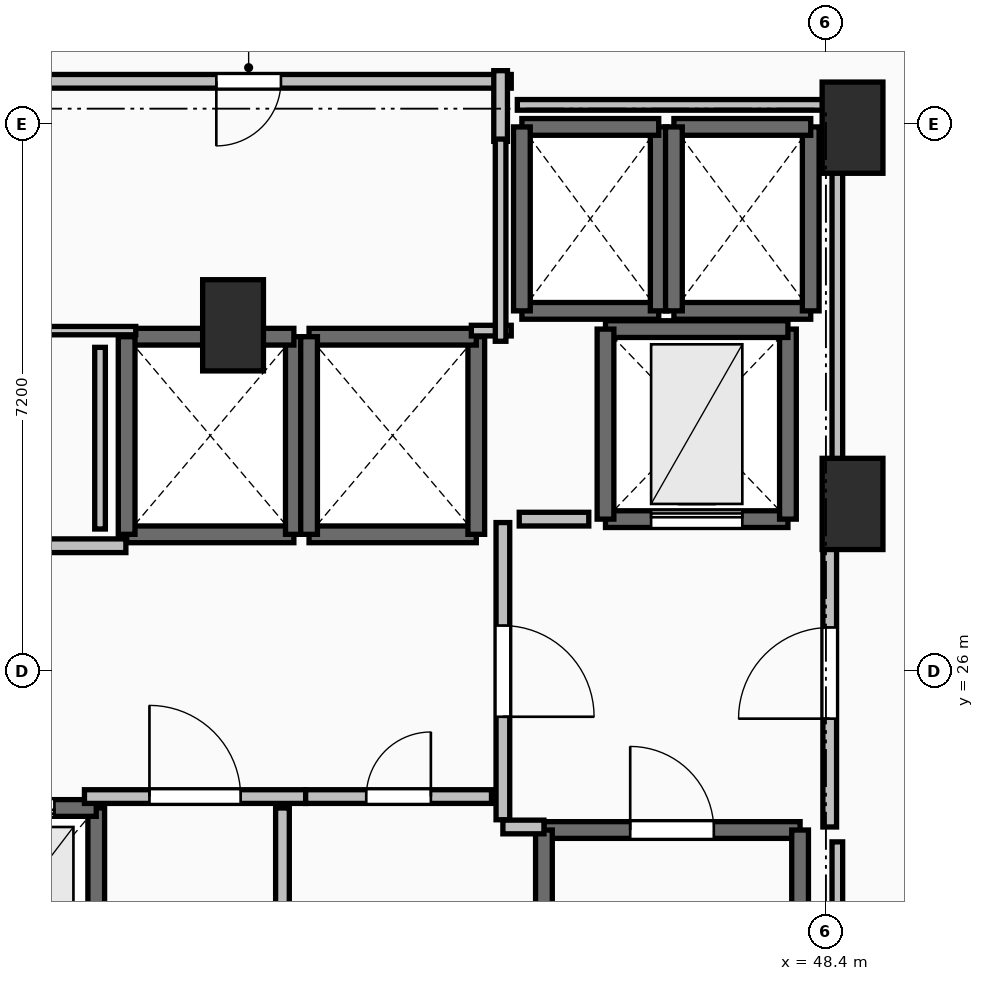
"""IFC4 building model, lengths in metres.
Left out: names, types, materials, properties, quantities, classifications, styles, units other than length and angle.
Written with IfcOpenShell. Run it as: python <this file> out.ifc"""

import sys

from ifc_helpers import new_model, si_unit, direction, frame, frame_2d, origin, origin_2d, place, context, subcontext, project, spatial, rectangle, extrude, element, fill, save


model = new_model("IFC4")
c1 = context("Model", 3, precision=1e-05, world=origin(), true_north=direction((0.0, 1.0)))
c2 = subcontext(c1, "Body", "Model", "MODEL_VIEW")
j1 = project(units=[si_unit("LENGTHUNIT", "METRE"), si_unit("PLANEANGLEUNIT", "RADIAN")], contexts=[c1])
p1 = place(None, origin())
s1 = spatial("IfcSite", under=j1, at=p1, CompositionType="ELEMENT")
p2 = place(p1, origin())
s2 = spatial("IfcBuilding", under=s1, at=p2, CompositionType="ELEMENT")
p3 = place(p2, frame((0.0, 0.0, 150.1)))
s3 = spatial("IfcBuildingStorey", under=s2, at=p3, CompositionType="ELEMENT", Elevation=150.1)
for number, where, z_axis, x_axis in (
    (1, (48.75, 33.15, 0.0), (0.0, 0.0, 1.0), (1.0, 0.0, 0.0)),
    (2, (48.75, 28.2, 0.0), (0.0, 0.0, 1.0), (1.0, 0.0, 0.0)),
    (3, (40.6, 30.55, 0.0), (0.0, 0.0, 1.0), (1.0, 0.0, 0.0)),
):
    element("IfcColumn", number, at=place(p3, frame(where, z_axis=z_axis, x_axis=x_axis)), inside=s3, PredefinedType="PILASTER", context=c2, shape_type="SweptSolid", body=[
        extrude(rectangle(XDim=0.8, YDim=1.2, at=origin_2d()), origin(), (0.0, 0.0, 1.0), 3.5),
    ])
p4 = place(p3, frame((44.69, 23.91, 0.0), z_axis=(0.0, 0.0, 1.0), x_axis=(1.0, 0.0, 0.0)))
e4 = element("IfcWall", 4, at=p4, inside=s3, PredefinedType="SOLIDWALL", context=c2, shape_type="SweptSolid", body=[
    extrude(rectangle(XDim=3.37, YDim=0.22, at=frame_2d((1.685, 0.0))), origin(), (0.0, 0.0, 1.0), 3.24),
])
p5 = place(p4, frame((1.135, 0.0, 0.0)))
e5 = element("IfcOpeningElement", 5, at=p5, cuts=e4, PredefinedType="OPENING", context=c2, shape_type="SweptSolid", body=[
    extrude(rectangle(XDim=1.1, YDim=2.15, at=frame_2d((0.55, 1.075))), frame((0.0, 0.125, 0.0), z_axis=(0.0, -1.0, 0.0), x_axis=(1.0, 0.0, 0.0)), (0.0, 0.0, 1.0), 0.25),
])
for number, where, z_axis, x_axis in (
    (6, (48.06, 23.91, 0.0), (0.0, 0.0, 1.0), (0.0, -1.0, 0.0)),
    (7, (44.69, 16.49, 0.0), (0.0, 0.0, 1.0), (0.0, 1.0, 0.0)),
):
    element("IfcWall", number, at=place(p3, frame(where, z_axis=z_axis, x_axis=x_axis)), inside=s3, PredefinedType="SOLIDWALL", context=c2, shape_type="SweptSolid", body=[
        extrude(rectangle(XDim=7.42, YDim=0.22, at=frame_2d((3.71, 0.0))), origin(), (0.0, 0.0, 1.0), 3.24),
    ])
p6 = place(p3, frame((38.8, 21.6, 0.0), z_axis=(0.0, 0.0, 1.0), x_axis=(0.0, 1.0, 0.0)))
e8 = element("IfcWall", 8, at=p6, inside=s3, PredefinedType="SOLIDWALL", context=c2, shape_type="SweptSolid", body=[
    extrude(rectangle(XDim=2.6, YDim=0.22, at=frame_2d((1.3, 0.0))), origin(), (0.0, 0.0, 1.0), 3.24),
])
p7 = place(p3, frame((38.8, 24.2, 0.0), z_axis=(0.0, 0.0, 1.0), x_axis=(-1.0, 0.0, 0.0)))
e9 = element("IfcWall", 9, at=p7, inside=s3, PredefinedType="SOLIDWALL", context=c2, shape_type="SweptSolid", body=[
    extrude(rectangle(XDim=2.2, YDim=0.22, at=frame_2d((1.1, 0.0))), origin(), (0.0, 0.0, 1.0), 3.24),
])
p8 = place(p7, frame((0.55, 0.0, 0.0)))
e10 = element("IfcOpeningElement", 10, at=p8, cuts=e9, PredefinedType="OPENING", context=c2, shape_type="SweptSolid", body=[
    extrude(rectangle(XDim=1.1, YDim=2.2, at=frame_2d((0.55, 1.1))), frame((0.0, 0.125, 0.0), z_axis=(0.0, -1.0, 0.0), x_axis=(1.0, 0.0, 0.0)), (0.0, 0.0, 1.0), 0.25),
])
p9 = place(p3, frame((39.2, 27.8, 0.0), z_axis=(0.0, 0.0, 1.0), x_axis=(1.0, 0.0, 0.0)))
e11 = element("IfcWall", 11, at=p9, inside=s3, PredefinedType="SOLIDWALL", context=c2, shape_type="SweptSolid", body=[
    extrude(rectangle(XDim=2.2, YDim=0.22, at=frame_2d((1.1, 0.0))), origin(), (0.0, 0.0, 1.0), 3.24),
])
p10 = place(p3, frame((41.4, 27.8, 0.0), z_axis=(0.0, 0.0, 1.0), x_axis=(0.0, 1.0, 0.0)))
e12 = element("IfcWall", 12, at=p10, inside=s3, PredefinedType="SOLIDWALL", context=c2, shape_type="SweptSolid", body=[
    extrude(rectangle(XDim=2.6, YDim=0.22, at=frame_2d((1.3, 0.0))), origin(), (0.0, 0.0, 1.0), 3.24),
])
p11 = place(p3, frame((41.4, 30.4, 0.0), z_axis=(0.0, 0.0, 1.0), x_axis=(-1.0, 0.0, 0.0)))
e13 = element("IfcWall", 13, at=p11, inside=s3, PredefinedType="SOLIDWALL", context=c2, shape_type="SweptSolid", body=[
    extrude(rectangle(XDim=2.2, YDim=0.22, at=frame_2d((1.1, 0.0))), origin(), (0.0, 0.0, 1.0), 3.24),
])
p12 = place(p3, frame((39.2, 30.4, 0.0), z_axis=(0.0, 0.0, 1.0), x_axis=(0.0, -1.0, 0.0)))
e14 = element("IfcWall", 14, at=p12, inside=s3, PredefinedType="SOLIDWALL", context=c2, shape_type="SweptSolid", body=[
    extrude(rectangle(XDim=2.6, YDim=0.22, at=frame_2d((1.3, 0.0))), origin(), (0.0, 0.0, 1.0), 3.24),
])
p13 = place(p3, frame((41.6, 27.8, 0.0), z_axis=(0.0, 0.0, 1.0), x_axis=(1.0, 0.0, 0.0)))
e15 = element("IfcWall", 15, at=p13, inside=s3, PredefinedType="SOLIDWALL", context=c2, shape_type="SweptSolid", body=[
    extrude(rectangle(XDim=2.2, YDim=0.22, at=frame_2d((1.1, 0.0))), origin(), (0.0, 0.0, 1.0), 3.24),
])
p14 = place(p3, frame((43.8, 27.8, 0.0), z_axis=(0.0, 0.0, 1.0), x_axis=(0.0, 1.0, 0.0)))
e16 = element("IfcWall", 16, at=p14, inside=s3, PredefinedType="SOLIDWALL", context=c2, shape_type="SweptSolid", body=[
    extrude(rectangle(XDim=2.6, YDim=0.22, at=frame_2d((1.3, 0.0))), origin(), (0.0, 0.0, 1.0), 3.24),
])
p15 = place(p3, frame((43.8, 30.4, 0.0), z_axis=(0.0, 0.0, 1.0), x_axis=(-1.0, 0.0, 0.0)))
e17 = element("IfcWall", 17, at=p15, inside=s3, PredefinedType="SOLIDWALL", context=c2, shape_type="SweptSolid", body=[
    extrude(rectangle(XDim=2.2, YDim=0.22, at=frame_2d((1.1, 0.0))), origin(), (0.0, 0.0, 1.0), 3.24),
])
p16 = place(p3, frame((41.6, 30.4, 0.0), z_axis=(0.0, 0.0, 1.0), x_axis=(0.0, -1.0, 0.0)))
e18 = element("IfcWall", 18, at=p16, inside=s3, PredefinedType="SOLIDWALL", context=c2, shape_type="SweptSolid", body=[
    extrude(rectangle(XDim=2.6, YDim=0.22, at=frame_2d((1.3, 0.0))), origin(), (0.0, 0.0, 1.0), 3.24),
])
p17 = place(p3, frame((44.4, 30.74, 0.0), z_axis=(0.0, 0.0, 1.0), x_axis=(1.0, 0.0, 0.0)))
e19 = element("IfcWall", 19, at=p17, inside=s3, PredefinedType="SOLIDWALL", context=c2, shape_type="SweptSolid", body=[
    extrude(rectangle(XDim=1.8, YDim=0.22, at=frame_2d((0.9, 0.0))), origin(), (0.0, 0.0, 1.0), 3.24),
])
p18 = place(p3, frame((46.2, 30.74, 0.0), z_axis=(0.0, 0.0, 1.0), x_axis=(0.0, 1.0, 0.0)))
e20 = element("IfcWall", 20, at=p18, inside=s3, PredefinedType="SOLIDWALL", context=c2, shape_type="SweptSolid", body=[
    extrude(rectangle(XDim=2.42, YDim=0.22, at=frame_2d((1.21, 0.0))), origin(), (0.0, 0.0, 1.0), 3.24),
])
p19 = place(p3, frame((46.2, 33.16, 0.0), z_axis=(0.0, 0.0, 1.0), x_axis=(-1.0, 0.0, 0.0)))
e21 = element("IfcWall", 21, at=p19, inside=s3, PredefinedType="SOLIDWALL", context=c2, shape_type="SweptSolid", body=[
    extrude(rectangle(XDim=1.8, YDim=0.22, at=frame_2d((0.9, 0.0))), origin(), (0.0, 0.0, 1.0), 3.24),
])
p20 = place(p3, frame((44.4, 33.16, 0.0), z_axis=(0.0, 0.0, 1.0), x_axis=(0.0, -1.0, 0.0)))
e22 = element("IfcWall", 22, at=p20, inside=s3, PredefinedType="SOLIDWALL", context=c2, shape_type="SweptSolid", body=[
    extrude(rectangle(XDim=2.42, YDim=0.22, at=frame_2d((1.21, 0.0))), origin(), (0.0, 0.0, 1.0), 3.24),
])
p21 = place(p3, frame((46.4, 30.74, 0.0), z_axis=(0.0, 0.0, 1.0), x_axis=(1.0, 0.0, 0.0)))
e23 = element("IfcWall", 23, at=p21, inside=s3, PredefinedType="SOLIDWALL", context=c2, shape_type="SweptSolid", body=[
    extrude(rectangle(XDim=1.8, YDim=0.22, at=frame_2d((0.9, 0.0))), origin(), (0.0, 0.0, 1.0), 3.24),
])
p22 = place(p3, frame((48.2, 30.74, 0.0), z_axis=(0.0, 0.0, 1.0), x_axis=(0.0, 1.0, 0.0)))
e24 = element("IfcWall", 24, at=p22, inside=s3, PredefinedType="SOLIDWALL", context=c2, shape_type="SweptSolid", body=[
    extrude(rectangle(XDim=2.42, YDim=0.22, at=frame_2d((1.21, 0.0))), origin(), (0.0, 0.0, 1.0), 3.24),
])
p23 = place(p3, frame((48.2, 33.16, 0.0), z_axis=(0.0, 0.0, 1.0), x_axis=(-1.0, 0.0, 0.0)))
e25 = element("IfcWall", 25, at=p23, inside=s3, PredefinedType="SOLIDWALL", context=c2, shape_type="SweptSolid", body=[
    extrude(rectangle(XDim=1.8, YDim=0.22, at=frame_2d((0.9, 0.0))), origin(), (0.0, 0.0, 1.0), 3.24),
])
p24 = place(p3, frame((46.4, 33.16, 0.0), z_axis=(0.0, 0.0, 1.0), x_axis=(0.0, -1.0, 0.0)))
e26 = element("IfcWall", 26, at=p24, inside=s3, PredefinedType="SOLIDWALL", context=c2, shape_type="SweptSolid", body=[
    extrude(rectangle(XDim=2.42, YDim=0.22, at=frame_2d((1.21, 0.0))), origin(), (0.0, 0.0, 1.0), 3.24),
])
p25 = place(p3, frame((45.5, 28.0, 0.0), z_axis=(0.0, 0.0, 1.0), x_axis=(1.0, 0.0, 0.0)))
e27 = element("IfcWall", 27, at=p25, inside=s3, PredefinedType="SHEAR", context=c2, shape_type="SweptSolid", body=[
    extrude(rectangle(XDim=2.4, YDim=0.22, at=frame_2d((1.2, 0.0))), origin(), (0.0, 0.0, 1.0), 3.24),
])
p26 = place(p25, frame((0.6, 0.0, 0.0)))
e28 = element("IfcOpeningElement", 28, at=p26, cuts=e27, PredefinedType="OPENING", context=c2, shape_type="SweptSolid", body=[
    extrude(rectangle(XDim=1.2, YDim=2.2, at=frame_2d((0.6, 1.1))), frame((0.0, 0.125, 0.0), z_axis=(0.0, -1.0, 0.0), x_axis=(1.0, 0.0, 0.0)), (0.0, 0.0, 1.0), 0.25),
])
p27 = place(p3, frame((47.9, 28.0, 0.0), z_axis=(0.0, 0.0, 1.0), x_axis=(0.0, 1.0, 0.0)))
e29 = element("IfcWall", 29, at=p27, inside=s3, PredefinedType="SHEAR", context=c2, shape_type="SweptSolid", body=[
    extrude(rectangle(XDim=2.5, YDim=0.22, at=frame_2d((1.25, 0.0))), origin(), (0.0, 0.0, 1.0), 3.24),
])
p28 = place(p3, frame((47.9, 30.5, 0.0), z_axis=(0.0, 0.0, 1.0), x_axis=(-1.0, 0.0, 0.0)))
e30 = element("IfcWall", 30, at=p28, inside=s3, PredefinedType="SHEAR", context=c2, shape_type="SweptSolid", body=[
    extrude(rectangle(XDim=2.4, YDim=0.22, at=frame_2d((1.2, 0.0))), origin(), (0.0, 0.0, 1.0), 3.24),
])
p29 = place(p3, frame((45.5, 30.5, 0.0), z_axis=(0.0, 0.0, 1.0), x_axis=(0.0, -1.0, 0.0)))
e31 = element("IfcWall", 31, at=p29, inside=s3, PredefinedType="SHEAR", context=c2, shape_type="SweptSolid", body=[
    extrude(rectangle(XDim=2.5, YDim=0.22, at=frame_2d((1.25, 0.0))), origin(), (0.0, 0.0, 1.0), 3.24),
])
p30 = place(p3, frame((44.15, 27.955, 0.0), z_axis=(0.0, 0.0, 1.0), x_axis=(0.0, -1.0, 0.0)))
e32 = element("IfcWall", 32, at=p30, inside=s3, PredefinedType="PARTITIONING", context=c2, shape_type="SweptSolid", body=[
    extrude(rectangle(XDim=3.91, YDim=0.18, at=frame_2d((1.955, 0.0))), origin(), (0.0, 0.0, 1.0), 3.24),
])
p31 = place(p30, frame((1.355, 0.0, 0.0)))
e33 = element("IfcOpeningElement", 33, at=p31, cuts=e32, PredefinedType="OPENING", context=c2, shape_type="SweptSolid", body=[
    extrude(rectangle(XDim=1.2, YDim=2.15, at=frame_2d((0.6, 1.075))), frame((0.0, 0.105, 0.0), z_axis=(0.0, -1.0, 0.0), x_axis=(1.0, 0.0, 0.0)), (0.0, 0.0, 1.0), 0.21),
])
p32 = place(p3, frame((44.15, 23.95, 0.0), z_axis=(0.0, 0.0, 1.0), x_axis=(1.0, 0.0, 0.0)))
e34 = element("IfcWall", 34, at=p32, inside=s3, PredefinedType="PARTITIONING", context=c2, shape_type="SweptSolid", body=[
    extrude(rectangle(XDim=0.54, YDim=0.18, at=frame_2d((0.27, 0.0))), origin(), (0.0, 0.0, 1.0), 3.24),
])
p33 = place(p3, frame((48.45, 23.95, 0.0), z_axis=(0.0, 0.0, 1.0), x_axis=(0.0, 1.0, 0.0)))
e35 = element("IfcWall", 35, at=p33, inside=s3, PredefinedType="PARTITIONING", context=c2, shape_type="SweptSolid", body=[
    extrude(rectangle(XDim=4.05, YDim=0.18, at=frame_2d((2.025, 0.0))), origin(), (0.0, 0.0, 1.0), 3.24),
])
p34 = place(p33, frame((1.425, 0.0, 0.0)))
e36 = element("IfcOpeningElement", 36, at=p34, cuts=e35, PredefinedType="OPENING", context=c2, shape_type="SweptSolid", body=[
    extrude(rectangle(XDim=1.2, YDim=2.15, at=frame_2d((0.6, 1.075))), frame((0.0, 0.105, 0.0), z_axis=(0.0, -1.0, 0.0), x_axis=(1.0, 0.0, 0.0)), (0.0, 0.0, 1.0), 0.21),
])
p35 = place(p3, frame((38.645, 24.35, 0.0), z_axis=(0.0, 0.0, 1.0), x_axis=(1.0, 0.0, 0.0)))
e37 = element("IfcWall", 37, at=p35, inside=s3, PredefinedType="PARTITIONING", context=c2, shape_type="SweptSolid", body=[
    extrude(rectangle(XDim=2.91, YDim=0.18, at=frame_2d((1.455, 0.0))), origin(), (0.0, 0.0, 1.0), 3.24),
])
p36 = place(p35, frame((0.855, 0.0, 0.0)))
e38 = element("IfcOpeningElement", 38, at=p36, cuts=e37, PredefinedType="OPENING", context=c2, shape_type="SweptSolid", body=[
    extrude(rectangle(XDim=1.2, YDim=2.15, at=frame_2d((0.6, 1.075))), frame((0.0, 0.105, 0.0), z_axis=(0.0, -1.0, 0.0), x_axis=(1.0, 0.0, 0.0)), (0.0, 0.0, 1.0), 0.21),
])
p37 = place(p3, frame((41.555, 24.35, 0.0), z_axis=(0.0, 0.0, 1.0), x_axis=(1.0, 0.0, 0.0)))
e39 = element("IfcWall", 39, at=p37, inside=s3, PredefinedType="PARTITIONING", context=c2, shape_type="SweptSolid", body=[
    extrude(rectangle(XDim=2.445, YDim=0.18, at=frame_2d((1.223, 0.0))), origin(), (0.0, 0.0, 1.0), 3.24),
])
p38 = place(p37, frame((0.798, 0.0, 0.0)))
e40 = element("IfcOpeningElement", 40, at=p38, cuts=e39, PredefinedType="OPENING", context=c2, shape_type="SweptSolid", body=[
    extrude(rectangle(XDim=0.85, YDim=2.1, at=frame_2d((0.425, 1.05))), frame((0.0, 0.105, 0.0), z_axis=(0.0, -1.0, 0.0), x_axis=(1.0, 0.0, 0.0)), (0.0, 0.0, 1.0), 0.21),
])
p39 = place(p3, frame((39.19, 27.65, 0.0), z_axis=(0.0, 0.0, 1.0), x_axis=(-1.0, 0.0, 0.0)))
e41 = element("IfcWall", 41, at=p39, inside=s3, PredefinedType="PARTITIONING", context=c2, shape_type="SweptSolid", body=[
    extrude(rectangle(XDim=7.19, YDim=0.18, at=frame_2d((3.595, 0.0))), origin(), (0.0, 0.0, 1.0), 3.24),
])
p40 = place(p39, frame((3.095, 0.0, 0.0)))
e42 = element("IfcOpeningElement", 42, at=p40, cuts=e41, PredefinedType="OPENING", context=c2, shape_type="SweptSolid", body=[
    extrude(rectangle(XDim=1.0, YDim=2.15, at=frame_2d((0.5, 1.075))), frame((0.0, 0.105, 0.0), z_axis=(0.0, -1.0, 0.0), x_axis=(1.0, 0.0, 0.0)), (0.0, 0.0, 1.0), 0.21),
])
p41 = place(p3, frame((41.25, 20.305, 0.0), z_axis=(0.0, 0.0, 1.0), x_axis=(0.0, 1.0, 0.0)))
e43 = element("IfcWall", 43, at=p41, inside=s3, PredefinedType="PARTITIONING", context=c2, shape_type="SweptSolid", body=[
    extrude(rectangle(XDim=3.895, YDim=0.18, at=frame_2d((1.948, 0.0))), origin(), (0.0, 0.0, 1.0), 3.24),
])
p42 = place(p41, frame((1.522, 0.0, 0.0)))
e44 = element("IfcOpeningElement", 44, at=p42, cuts=e43, PredefinedType="OPENING", context=c2, shape_type="SweptSolid", body=[
    extrude(rectangle(XDim=0.85, YDim=2.1, at=frame_2d((0.425, 1.05))), frame((0.0, 0.105, 0.0), z_axis=(0.0, -1.0, 0.0), x_axis=(1.0, 0.0, 0.0)), (0.0, 0.0, 1.0), 0.21),
])
p43 = place(p3, frame((37.365, 30.48, 0.0), z_axis=(0.0, 0.0, 1.0), x_axis=(1.0, 0.0, 0.0)))
e45 = element("IfcWall", 45, at=p43, inside=s3, PredefinedType="PARTITIONING", context=c2, shape_type="SweptSolid", body=[
    extrude(rectangle(XDim=1.955, YDim=0.11, at=frame_2d((0.978, 0.0))), origin(), (0.0, 0.0, 1.0), 2.432),
])
p44 = place(p3, frame((44.26, 33.76, 0.0), z_axis=(0.0, 0.0, 1.0), x_axis=(-1.0, 0.0, 0.0)))
e46 = element("IfcWall", 46, at=p44, inside=s3, PredefinedType="PARTITIONING", context=c2, shape_type="SweptSolid", body=[
    extrude(rectangle(XDim=6.91, YDim=0.18, at=frame_2d((3.455, 0.0))), origin(), (0.0, 0.0, 1.0), 3.24),
])
p45 = place(p44, frame((3.03, 0.0, 0.0)))
e47 = element("IfcOpeningElement", 47, at=p45, cuts=e46, PredefinedType="OPENING", context=c2, shape_type="SweptSolid", body=[
    extrude(rectangle(XDim=0.85, YDim=2.1, at=frame_2d((0.425, 1.05))), frame((0.0, 0.105, 0.0), z_axis=(0.0, -1.0, 0.0), x_axis=(1.0, 0.0, 0.0)), (0.0, 0.0, 1.0), 0.21),
])
p46 = place(p3, frame((44.12, 32.97, 0.0), z_axis=(0.0, 0.0, 1.0), x_axis=(0.0, 1.0, 0.0)))
e48 = element("IfcWall", 48, at=p46, inside=s3, PredefinedType="PARTITIONING", context=c2, shape_type="SweptSolid", body=[
    extrude(rectangle(XDim=0.93, YDim=0.18, at=frame_2d((0.465, 0.0))), origin(), (0.0, 0.0, 1.0), 3.24),
])
p47 = place(p3, frame((45.28, 28.0, 0.0), z_axis=(0.0, 0.0, 1.0), x_axis=(-1.0, 0.0, 0.0)))
e49 = element("IfcWall", 49, at=p47, inside=s3, PredefinedType="PARTITIONING", context=c2, shape_type="SweptSolid", body=[
    extrude(rectangle(XDim=0.915, YDim=0.18, at=frame_2d((0.458, 0.0))), origin(), (0.0, 0.0, 1.0), 3.24),
])
p48 = place(p3, frame((43.735, 30.48, 0.0), z_axis=(0.0, 0.0, 1.0), x_axis=(1.0, 0.0, 0.0)))
e50 = element("IfcWall", 50, at=p48, inside=s3, PredefinedType="PARTITIONING", context=c2, shape_type="SweptSolid", body=[
    extrude(rectangle(XDim=0.525, YDim=0.14, at=frame_2d((0.262, 0.0))), origin(), (0.0, 0.0, 1.0), 3.24),
])
p49 = place(p3, frame((44.12, 30.34, 0.0), z_axis=(0.0, 0.0, 1.0), x_axis=(0.0, 1.0, 0.0)))
e51 = element("IfcWall", 51, at=p49, inside=s3, PredefinedType="PARTITIONING", context=c2, shape_type="SweptSolid", body=[
    extrude(rectangle(XDim=2.66, YDim=0.14, at=frame_2d((1.33, 0.0))), origin(), (0.0, 0.0, 1.0), 3.24),
])
p50 = place(p3, frame((38.85, 27.87, 0.0), z_axis=(0.0, 0.0, 1.0), x_axis=(0.0, 1.0, 0.0)))
e52 = element("IfcWall", 52, at=p50, inside=s3, PredefinedType="PARTITIONING", context=c2, shape_type="SweptSolid", body=[
    extrude(rectangle(XDim=2.39, YDim=0.14, at=frame_2d((1.195, 0.0))), origin(), (0.0, 0.0, 1.0), 3.24),
])
p51 = place(p3, frame((48.55, 16.24, 0.0), z_axis=(0.0, 0.0, 1.0), x_axis=(0.0, 1.0, 0.0)))
e53 = element("IfcWall", 53, at=p51, inside=s3, PredefinedType="PARTITIONING", context=c2, shape_type="SweptSolid", body=[
    extrude(rectangle(XDim=7.514, YDim=0.14, at=frame_2d((3.757, 0.0))), origin(), (0.0, 0.0, 1.0), 2.432),
])
p52 = place(p3, frame((48.55, 28.196, 0.0), z_axis=(0.0, 0.0, 1.0), x_axis=(0.0, 1.0, 0.0)))
e54 = element("IfcWall", 54, at=p52, inside=s3, PredefinedType="PARTITIONING", context=c2, shape_type="SweptSolid", body=[
    extrude(rectangle(XDim=5.254, YDim=0.14, at=frame_2d((2.627, 0.0))), origin(), (0.0, 0.0, 1.0), 2.432),
])
p53 = place(p3, frame((48.55, 33.45, 0.0), z_axis=(0.0, 0.0, 1.0), x_axis=(-1.0, 0.0, 0.0)))
e55 = element("IfcWall", 55, at=p53, inside=s3, PredefinedType="PARTITIONING", context=c2, shape_type="SweptSolid", body=[
    extrude(rectangle(XDim=4.21, YDim=0.14, at=frame_2d((2.105, 0.0))), origin(), (0.0, 0.0, 1.0), 2.432),
])
p54 = place(p5, origin())
e56 = element("IfcDoor", 56, at=p54, inside=s3, OperationType="SINGLE_SWING_LEFT", PredefinedType="DOOR", context=c2, shape_type="SweptSolid", body=[
    extrude(rectangle(XDim=1.1, YDim=2.15, at=frame_2d((0.55, 1.075))), frame((0.0, 0.025, 0.0), z_axis=(0.0, -1.0, 0.0), x_axis=(1.0, 0.0, 0.0)), (0.0, 0.0, 1.0), 0.05),
])
fill(e5, e56)
p55 = place(p8, origin())
e57 = element("IfcDoor", 57, at=p55, inside=s3, OperationType="SLIDING_TO_LEFT", PredefinedType="DOOR", context=c2, shape_type="SweptSolid", body=[
    extrude(rectangle(XDim=1.1, YDim=2.2, at=frame_2d((0.55, 1.1))), frame((0.0, 0.025, 0.0), z_axis=(0.0, -1.0, 0.0), x_axis=(1.0, 0.0, 0.0)), (0.0, 0.0, 1.0), 0.05),
])
fill(e10, e57)
p56 = place(p26, origin())
e58 = element("IfcDoor", 58, at=p56, inside=s3, OperationType="SLIDING_TO_LEFT", PredefinedType="DOOR", context=c2, shape_type="SweptSolid", body=[
    extrude(rectangle(XDim=1.2, YDim=2.2, at=frame_2d((0.6, 1.1))), frame((0.0, 0.025, 0.0), z_axis=(0.0, -1.0, 0.0), x_axis=(1.0, 0.0, 0.0)), (0.0, 0.0, 1.0), 0.05),
])
fill(e28, e58)
p57 = place(p31, origin())
e59 = element("IfcDoor", 59, at=p57, inside=s3, OperationType="SINGLE_SWING_RIGHT", PredefinedType="DOOR", context=c2, shape_type="SweptSolid", body=[
    extrude(rectangle(XDim=1.2, YDim=2.15, at=frame_2d((0.6, 1.075))), frame((0.0, 0.025, 0.0), z_axis=(0.0, -1.0, 0.0), x_axis=(1.0, 0.0, 0.0)), (0.0, 0.0, 1.0), 0.05),
])
fill(e33, e59)
p58 = place(p34, origin())
e60 = element("IfcDoor", 60, at=p58, inside=s3, OperationType="SINGLE_SWING_LEFT", PredefinedType="DOOR", context=c2, shape_type="SweptSolid", body=[
    extrude(rectangle(XDim=1.2, YDim=2.15, at=frame_2d((0.6, 1.075))), frame((0.0, 0.025, 0.0), z_axis=(0.0, -1.0, 0.0), x_axis=(1.0, 0.0, 0.0)), (0.0, 0.0, 1.0), 0.05),
])
fill(e36, e60)
p59 = place(p36, origin())
e61 = element("IfcDoor", 61, at=p59, inside=s3, OperationType="SINGLE_SWING_LEFT", PredefinedType="DOOR", context=c2, shape_type="SweptSolid", body=[
    extrude(rectangle(XDim=1.2, YDim=2.15, at=frame_2d((0.6, 1.075))), frame((0.0, 0.025, 0.0), z_axis=(0.0, -1.0, 0.0), x_axis=(1.0, 0.0, 0.0)), (0.0, 0.0, 1.0), 0.05),
])
fill(e38, e61)
p60 = place(p38, origin())
e62 = element("IfcDoor", 62, at=p60, inside=s3, OperationType="SINGLE_SWING_RIGHT", PredefinedType="DOOR", context=c2, shape_type="SweptSolid", body=[
    extrude(rectangle(XDim=0.85, YDim=2.1, at=frame_2d((0.425, 1.05))), frame((0.0, 0.025, 0.0), z_axis=(0.0, -1.0, 0.0), x_axis=(1.0, 0.0, 0.0)), (0.0, 0.0, 1.0), 0.05),
])
fill(e40, e62)
p61 = place(p45, origin())
e63 = element("IfcDoor", 63, at=p61, inside=s3, OperationType="SINGLE_SWING_RIGHT", PredefinedType="DOOR", context=c2, shape_type="SweptSolid", body=[
    extrude(rectangle(XDim=0.85, YDim=2.1, at=frame_2d((0.425, 1.05))), frame((0.0, 0.025, 0.0), z_axis=(0.0, -1.0, 0.0), x_axis=(1.0, 0.0, 0.0)), (0.0, 0.0, 1.0), 0.05),
])
fill(e47, e63)
save(model, sys.argv[1])
